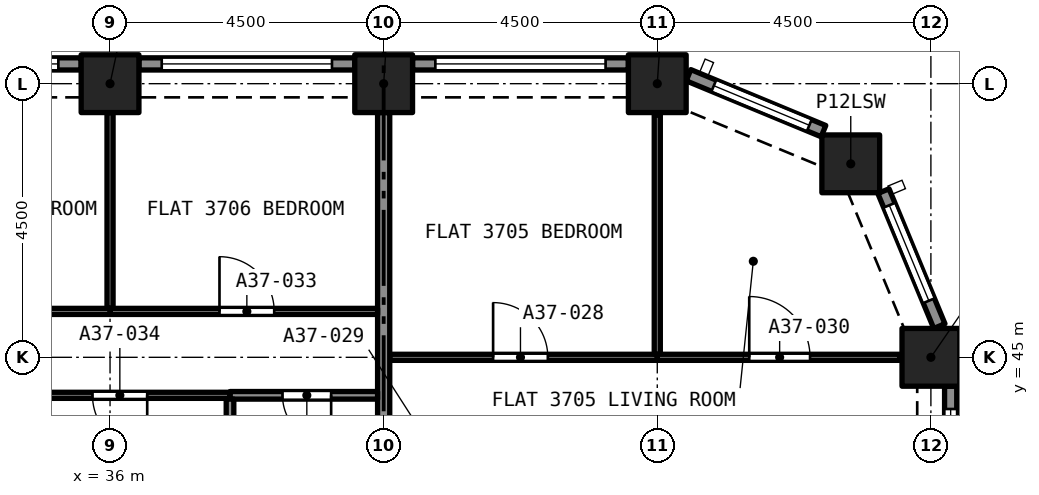
"""IFC4 building model, lengths in metres.
Left out: names, types, materials, properties, quantities, classifications, styles, units other than length and angle.
Written with IfcOpenShell. Run it as: python <this file> out.ifc"""

import sys

from ifc_helpers import new_model, si_unit, direction, frame, frame_2d, origin, origin_2d, place, context, subcontext, project, spatial, rectangle, extrude, element, fill, save


model = new_model("IFC4")
c1 = context("Model", 3, precision=1e-05, world=origin(), true_north=direction((0.0, 1.0)))
c2 = subcontext(c1, "Body", "Model", "MODEL_VIEW")
j1 = project(units=[si_unit("LENGTHUNIT", "METRE"), si_unit("PLANEANGLEUNIT", "RADIAN")], contexts=[c1])
p1 = place(None, origin())
s1 = spatial("IfcSite", under=j1, at=p1, CompositionType="ELEMENT")
p2 = place(p1, origin())
s2 = spatial("IfcBuilding", under=s1, at=p2, CompositionType="ELEMENT")
p3 = place(p2, frame((0.0, 0.0, 133.4)))
s3 = spatial("IfcBuildingStorey", under=s2, at=p3, CompositionType="ELEMENT", Elevation=133.4)
for number, where, z_axis, x_axis in (
    (1, (49.5, 45.0, 0.0), (0.0, 0.0, 1.0), (1.0, 0.0, 0.0)),
    (2, (48.182, 48.182, 0.0), (0.0, 0.0, 1.0), (1.0, 0.0, 0.0)),
    (3, (36.0, 49.5, 0.0), (0.0, 0.0, 1.0), (1.0, 0.0, 0.0)),
    (4, (40.5, 49.5, 0.0), (0.0, 0.0, 1.0), (1.0, 0.0, 0.0)),
    (5, (45.0, 49.5, 0.0), (0.0, 0.0, 1.0), (1.0, 0.0, 0.0)),
):
    element("IfcColumn", number, at=place(p3, frame(where, z_axis=z_axis, x_axis=x_axis)), inside=s3, PredefinedType="COLUMN", context=c2, shape_type="SweptSolid", body=[
        extrude(rectangle(XDim=0.95, YDim=0.95, at=origin_2d()), origin(), (0.0, 0.0, 1.0), 3.2),
    ])
p4 = place(p3, frame((49.825, 44.525, 0.0), z_axis=(0.0, 0.0, 1.0), x_axis=(0.0, -1.0, 0.0)))
e6 = element("IfcWall", 6, at=p4, inside=s3, PredefinedType="SOLIDWALL", context=c2, shape_type="SweptSolid", body=[
    extrude(rectangle(XDim=3.55, YDim=0.2, at=frame_2d((1.775, 0.0))), origin(), (0.0, 0.0, 1.0), 3.2),
])
p5 = place(p4, frame((0.375, 0.0, 0.45)))
e7 = element("IfcOpeningElement", 7, at=p5, cuts=e6, PredefinedType="OPENING", context=c2, shape_type="SweptSolid", body=[
    extrude(rectangle(XDim=2.8, YDim=1.95, at=frame_2d((1.4, 0.975))), frame((0.0, 0.11, 0.0), z_axis=(0.0, -1.0, 0.0), x_axis=(1.0, 0.0, 0.0)), (0.0, 0.0, 1.0), 0.22),
])
p6 = place(p3, frame((48.72, 47.733, 0.0), z_axis=(0.0, 0.0, 1.0), x_axis=(0.382680855588, -0.923880599843, 0.0)))
e8 = element("IfcWall", 8, at=p6, inside=s3, PredefinedType="SOLIDWALL", context=c2, shape_type="SweptSolid", body=[
    extrude(rectangle(XDim=2.403, YDim=0.2, at=frame_2d((1.201, 0.0))), origin(), (0.0, 0.0, 1.0), 3.2),
])
p7 = place(p6, frame((0.251, 0.0, 0.45)))
e9 = element("IfcOpeningElement", 9, at=p7, cuts=e8, PredefinedType="OPENING", context=c2, shape_type="SweptSolid", body=[
    extrude(rectangle(XDim=1.7, YDim=1.95, at=frame_2d((0.85, 0.975))), frame((0.0, 0.11, 0.0), z_axis=(0.0, -1.0, 0.0), x_axis=(1.0, 0.0, 0.0)), (0.0, 0.0, 1.0), 0.22),
])
p8 = place(p3, frame((45.513, 49.639, 0.0), z_axis=(0.0, 0.0, 1.0), x_axis=(0.923880599843, -0.382680855588, 0.0)))
e10 = element("IfcWall", 10, at=p8, inside=s3, PredefinedType="SOLIDWALL", context=c2, shape_type="SweptSolid", body=[
    extrude(rectangle(XDim=2.403, YDim=0.2, at=frame_2d((1.201, 0.0))), origin(), (0.0, 0.0, 1.0), 3.2),
])
p9 = place(p8, frame((0.451, 0.0, 0.45)))
e11 = element("IfcOpeningElement", 11, at=p9, cuts=e10, PredefinedType="OPENING", context=c2, shape_type="SweptSolid", body=[
    extrude(rectangle(XDim=1.7, YDim=1.95, at=frame_2d((0.85, 0.975))), frame((0.0, 0.11, 0.0), z_axis=(0.0, -1.0, 0.0), x_axis=(1.0, 0.0, 0.0)), (0.0, 0.0, 1.0), 0.22),
])
p10 = place(p3, frame((40.975, 49.825, 0.0), z_axis=(0.0, 0.0, 1.0), x_axis=(1.0, 0.0, 0.0)))
e12 = element("IfcWall", 12, at=p10, inside=s3, PredefinedType="SOLIDWALL", context=c2, shape_type="SweptSolid", body=[
    extrude(rectangle(XDim=3.55, YDim=0.2, at=frame_2d((1.775, 0.0))), origin(), (0.0, 0.0, 1.0), 3.2),
])
p11 = place(p10, frame((0.375, 0.0, 0.45)))
e13 = element("IfcOpeningElement", 13, at=p11, cuts=e12, PredefinedType="OPENING", context=c2, shape_type="SweptSolid", body=[
    extrude(rectangle(XDim=2.8, YDim=1.95, at=frame_2d((1.4, 0.975))), frame((0.0, 0.11, 0.0), z_axis=(0.0, -1.0, 0.0), x_axis=(1.0, 0.0, 0.0)), (0.0, 0.0, 1.0), 0.22),
])
p12 = place(p3, frame((36.475, 49.825, 0.0), z_axis=(0.0, 0.0, 1.0), x_axis=(1.0, 0.0, 0.0)))
e14 = element("IfcWall", 14, at=p12, inside=s3, PredefinedType="SOLIDWALL", context=c2, shape_type="SweptSolid", body=[
    extrude(rectangle(XDim=3.55, YDim=0.2, at=frame_2d((1.775, 0.0))), origin(), (0.0, 0.0, 1.0), 3.2),
])
p13 = place(p12, frame((0.375, 0.0, 0.45)))
e15 = element("IfcOpeningElement", 15, at=p13, cuts=e14, PredefinedType="OPENING", context=c2, shape_type="SweptSolid", body=[
    extrude(rectangle(XDim=2.8, YDim=1.95, at=frame_2d((1.4, 0.975))), frame((0.0, 0.11, 0.0), z_axis=(0.0, -1.0, 0.0), x_axis=(1.0, 0.0, 0.0)), (0.0, 0.0, 1.0), 0.22),
])
p14 = place(p3, frame((31.975, 49.825, 0.0), z_axis=(0.0, 0.0, 1.0), x_axis=(1.0, 0.0, 0.0)))
e16 = element("IfcWall", 16, at=p14, inside=s3, PredefinedType="SOLIDWALL", context=c2, shape_type="SweptSolid", body=[
    extrude(rectangle(XDim=3.55, YDim=0.2, at=frame_2d((1.775, 0.0))), origin(), (0.0, 0.0, 1.0), 3.2),
])
p15 = place(p14, frame((0.375, 0.0, 0.45)))
e17 = element("IfcOpeningElement", 17, at=p15, cuts=e16, PredefinedType="OPENING", context=c2, shape_type="SweptSolid", body=[
    extrude(rectangle(XDim=2.8, YDim=1.95, at=frame_2d((1.4, 0.975))), frame((0.0, 0.11, 0.0), z_axis=(0.0, -1.0, 0.0), x_axis=(1.0, 0.0, 0.0)), (0.0, 0.0, 1.0), 0.22),
])
p16 = place(p3, frame((40.6, 45.0, 0.0), z_axis=(0.0, 0.0, 1.0), x_axis=(1.0, 0.0, 0.0)))
e18 = element("IfcWall", 18, at=p16, inside=s3, PredefinedType="PARTITIONING", context=c2, shape_type="SweptSolid", body=[
    extrude(rectangle(XDim=4.4, YDim=0.1, at=frame_2d((2.2, 0.0))), origin(), (0.0, 0.0, 1.0), 2.9),
])
p17 = place(p16, frame((1.7, 0.0, 0.0)))
e19 = element("IfcOpeningElement", 19, at=p17, cuts=e18, PredefinedType="OPENING", context=c2, shape_type="SweptSolid", body=[
    extrude(rectangle(XDim=0.9, YDim=2.1, at=frame_2d((0.45, 1.05))), frame((0.0, 0.06, 0.0), z_axis=(0.0, -1.0, 0.0), x_axis=(1.0, 0.0, 0.0)), (0.0, 0.0, 1.0), 0.12),
])
p18 = place(p3, frame((45.0, 45.05, 0.0), z_axis=(0.0, 0.0, 1.0), x_axis=(0.0, 1.0, 0.0)))
e20 = element("IfcWall", 20, at=p18, inside=s3, PredefinedType="PARTITIONING", context=c2, shape_type="SweptSolid", body=[
    extrude(rectangle(XDim=3.936, YDim=0.1, at=frame_2d((1.968, 0.0))), origin(), (0.0, 0.0, 1.0), 2.9),
])
p19 = place(p3, frame((45.0, 45.0, 0.0), z_axis=(0.0, 0.0, 1.0), x_axis=(1.0, 0.0, 0.0)))
e21 = element("IfcWall", 21, at=p19, inside=s3, PredefinedType="PARTITIONING", context=c2, shape_type="SweptSolid", body=[
    extrude(rectangle(XDim=3.986, YDim=0.1, at=frame_2d((1.993, 0.0))), origin(), (0.0, 0.0, 1.0), 2.9),
])
p20 = place(p19, frame((1.512, 0.0, 0.0)))
e22 = element("IfcOpeningElement", 22, at=p20, cuts=e21, PredefinedType="OPENING", context=c2, shape_type="SweptSolid", body=[
    extrude(rectangle(XDim=1.0, YDim=2.1, at=frame_2d((0.5, 1.05))), frame((0.0, 0.06, 0.0), z_axis=(0.0, -1.0, 0.0), x_axis=(1.0, 0.0, 0.0)), (0.0, 0.0, 1.0), 0.12),
])
p21 = place(p3, frame((40.5, 40.25, 0.0), z_axis=(0.0, 0.0, 1.0), x_axis=(0.0, 1.0, 0.0)))
e23 = element("IfcWall", 23, at=p21, inside=s3, PredefinedType="PARTITIONING", context=c2, shape_type="SweptSolid", body=[
    extrude(rectangle(XDim=8.775, YDim=0.2, at=frame_2d((4.387, 0.0))), origin(), (0.0, 0.0, 1.0), 2.9),
])
p22 = place(p3, frame((40.4, 44.375, 0.0), z_axis=(0.0, 0.0, 1.0), x_axis=(-1.0, 0.0, 0.0)))
e24 = element("IfcWall", 24, at=p22, inside=s3, PredefinedType="PARTITIONING", context=c2, shape_type="SweptSolid", body=[
    extrude(rectangle(XDim=2.427, YDim=0.125, at=frame_2d((1.214, 0.0))), origin(), (0.0, 0.0, 1.0), 2.9),
])
p23 = place(p22, frame((0.764, 0.0, 0.0)))
e25 = element("IfcOpeningElement", 25, at=p23, cuts=e24, PredefinedType="OPENING", context=c2, shape_type="SweptSolid", body=[
    extrude(rectangle(XDim=0.8, YDim=2.1, at=frame_2d((0.4, 1.05))), frame((0.0, 0.073, 0.0), z_axis=(0.0, -1.0, 0.0), x_axis=(1.0, 0.0, 0.0)), (0.0, 0.0, 1.0), 0.145),
])
p24 = place(p3, frame((37.973, 40.25, 0.0), z_axis=(0.0, 0.0, 1.0), x_axis=(0.0, 1.0, 0.0)))
e26 = element("IfcWall", 26, at=p24, inside=s3, PredefinedType="PARTITIONING", context=c2, shape_type="SweptSolid", body=[
    extrude(rectangle(XDim=4.062, YDim=0.125, at=frame_2d((2.031, 0.0))), origin(), (0.0, 0.0, 1.0), 2.9),
])
p25 = place(p3, frame((36.0, 45.755, 0.0), z_axis=(0.0, 0.0, 1.0), x_axis=(1.0, 0.0, 0.0)))
e27 = element("IfcWall", 27, at=p25, inside=s3, PredefinedType="PARTITIONING", context=c2, shape_type="SweptSolid", body=[
    extrude(rectangle(XDim=4.4, YDim=0.1, at=frame_2d((2.2, 0.0))), origin(), (0.0, 0.0, 1.0), 2.9),
])
p26 = place(p25, frame((1.8, 0.0, 0.0)))
e28 = element("IfcOpeningElement", 28, at=p26, cuts=e27, PredefinedType="OPENING", context=c2, shape_type="SweptSolid", body=[
    extrude(rectangle(XDim=0.9, YDim=2.1, at=frame_2d((0.45, 1.05))), frame((0.0, 0.06, 0.0), z_axis=(0.0, -1.0, 0.0), x_axis=(1.0, 0.0, 0.0)), (0.0, 0.0, 1.0), 0.12),
])
p27 = place(p3, frame((36.0, 45.805, 0.0), z_axis=(0.0, 0.0, 1.0), x_axis=(0.0, 1.0, 0.0)))
e29 = element("IfcWall", 29, at=p27, inside=s3, PredefinedType="PARTITIONING", context=c2, shape_type="SweptSolid", body=[
    extrude(rectangle(XDim=3.22, YDim=0.1, at=frame_2d((1.61, 0.0))), origin(), (0.0, 0.0, 1.0), 2.9),
])
p28 = place(p3, frame((37.973, 44.375, 0.0), z_axis=(0.0, 0.0, 1.0), x_axis=(-1.0, 0.0, 0.0)))
e30 = element("IfcWall", 30, at=p28, inside=s3, PredefinedType="PARTITIONING", context=c2, shape_type="SweptSolid", body=[
    extrude(rectangle(XDim=3.673, YDim=0.1, at=frame_2d((1.836, 0.0))), origin(), (0.0, 0.0, 1.0), 2.9),
])
p29 = place(p28, frame((1.361, 0.0, 0.0)))
e31 = element("IfcOpeningElement", 31, at=p29, cuts=e30, PredefinedType="OPENING", context=c2, shape_type="SweptSolid", body=[
    extrude(rectangle(XDim=0.9, YDim=2.1, at=frame_2d((0.45, 1.05))), frame((0.0, 0.06, 0.0), z_axis=(0.0, -1.0, 0.0), x_axis=(1.0, 0.0, 0.0)), (0.0, 0.0, 1.0), 0.12),
])
p30 = place(p3, frame((31.6, 45.755, 0.0), z_axis=(0.0, 0.0, 1.0), x_axis=(1.0, 0.0, 0.0)))
e32 = element("IfcWall", 32, at=p30, inside=s3, PredefinedType="PARTITIONING", context=c2, shape_type="SweptSolid", body=[
    extrude(rectangle(XDim=4.4, YDim=0.1, at=frame_2d((2.2, 0.0))), origin(), (0.0, 0.0, 1.0), 2.9),
])
p31 = place(p30, frame((1.65, 0.0, 0.0)))
e33 = element("IfcOpeningElement", 33, at=p31, cuts=e32, PredefinedType="OPENING", context=c2, shape_type="SweptSolid", body=[
    extrude(rectangle(XDim=1.0, YDim=2.1, at=frame_2d((0.5, 1.05))), frame((0.0, 0.06, 0.0), z_axis=(0.0, -1.0, 0.0), x_axis=(1.0, 0.0, 0.0)), (0.0, 0.0, 1.0), 0.12),
])
p32 = place(p5, origin())
e34 = element("IfcWindow", 34, at=p32, inside=s3, PartitioningType="SINGLE_PANEL", PredefinedType="WINDOW", context=c2, shape_type="SweptSolid", body=[
    extrude(rectangle(XDim=2.8, YDim=1.95, at=frame_2d((1.4, 0.975))), frame((0.0, 0.03, 0.0), z_axis=(0.0, -1.0, 0.0), x_axis=(1.0, 0.0, 0.0)), (0.0, 0.0, 1.0), 0.06),
])
fill(e7, e34)
p33 = place(p7, origin())
e35 = element("IfcWindow", 35, at=p33, inside=s3, PartitioningType="SINGLE_PANEL", PredefinedType="WINDOW", context=c2, shape_type="SweptSolid", body=[
    extrude(rectangle(XDim=1.7, YDim=1.95, at=frame_2d((0.85, 0.975))), frame((0.0, 0.03, 0.0), z_axis=(0.0, -1.0, 0.0), x_axis=(1.0, 0.0, 0.0)), (0.0, 0.0, 1.0), 0.06),
])
fill(e9, e35)
p34 = place(p9, origin())
e36 = element("IfcWindow", 36, at=p34, inside=s3, PartitioningType="SINGLE_PANEL", PredefinedType="WINDOW", context=c2, shape_type="SweptSolid", body=[
    extrude(rectangle(XDim=1.7, YDim=1.95, at=frame_2d((0.85, 0.975))), frame((0.0, 0.03, 0.0), z_axis=(0.0, -1.0, 0.0), x_axis=(1.0, 0.0, 0.0)), (0.0, 0.0, 1.0), 0.06),
])
fill(e11, e36)
p35 = place(p11, origin())
e37 = element("IfcWindow", 37, at=p35, inside=s3, PartitioningType="SINGLE_PANEL", PredefinedType="WINDOW", context=c2, shape_type="SweptSolid", body=[
    extrude(rectangle(XDim=2.8, YDim=1.95, at=frame_2d((1.4, 0.975))), frame((0.0, 0.03, 0.0), z_axis=(0.0, -1.0, 0.0), x_axis=(1.0, 0.0, 0.0)), (0.0, 0.0, 1.0), 0.06),
])
fill(e13, e37)
p36 = place(p13, origin())
e38 = element("IfcWindow", 38, at=p36, inside=s3, PartitioningType="SINGLE_PANEL", PredefinedType="WINDOW", context=c2, shape_type="SweptSolid", body=[
    extrude(rectangle(XDim=2.8, YDim=1.95, at=frame_2d((1.4, 0.975))), frame((0.0, 0.03, 0.0), z_axis=(0.0, -1.0, 0.0), x_axis=(1.0, 0.0, 0.0)), (0.0, 0.0, 1.0), 0.06),
])
fill(e15, e38)
p37 = place(p15, origin())
e39 = element("IfcWindow", 39, at=p37, inside=s3, PartitioningType="SINGLE_PANEL", PredefinedType="WINDOW", context=c2, shape_type="SweptSolid", body=[
    extrude(rectangle(XDim=2.8, YDim=1.95, at=frame_2d((1.4, 0.975))), frame((0.0, 0.03, 0.0), z_axis=(0.0, -1.0, 0.0), x_axis=(1.0, 0.0, 0.0)), (0.0, 0.0, 1.0), 0.06),
])
fill(e17, e39)
p38 = place(p17, origin())
e40 = element("IfcDoor", 40, at=p38, inside=s3, OperationType="SINGLE_SWING_LEFT", PredefinedType="DOOR", context=c2, shape_type="SweptSolid", body=[
    extrude(rectangle(XDim=0.9, YDim=2.1, at=frame_2d((0.45, 1.05))), frame((0.0, 0.025, 0.0), z_axis=(0.0, -1.0, 0.0), x_axis=(1.0, 0.0, 0.0)), (0.0, 0.0, 1.0), 0.05),
])
fill(e19, e40)
p39 = place(p20, origin())
e41 = element("IfcDoor", 41, at=p39, inside=s3, OperationType="SINGLE_SWING_RIGHT", PredefinedType="DOOR", context=c2, shape_type="SweptSolid", body=[
    extrude(rectangle(XDim=1.0, YDim=2.1, at=frame_2d((0.5, 1.05))), frame((0.0, 0.025, 0.0), z_axis=(0.0, -1.0, 0.0), x_axis=(1.0, 0.0, 0.0)), (0.0, 0.0, 1.0), 0.05),
])
fill(e22, e41)
p40 = place(p23, origin())
e42 = element("IfcDoor", 42, at=p40, inside=s3, OperationType="SINGLE_SWING_LEFT", PredefinedType="DOOR", context=c2, shape_type="SweptSolid", body=[
    extrude(rectangle(XDim=0.8, YDim=2.1, at=frame_2d((0.4, 1.05))), frame((0.0, 0.025, 0.0), z_axis=(0.0, -1.0, 0.0), x_axis=(1.0, 0.0, 0.0)), (0.0, 0.0, 1.0), 0.05),
])
fill(e25, e42)
p41 = place(p26, origin())
e43 = element("IfcDoor", 43, at=p41, inside=s3, OperationType="SINGLE_SWING_RIGHT", PredefinedType="DOOR", context=c2, shape_type="SweptSolid", body=[
    extrude(rectangle(XDim=0.9, YDim=2.1, at=frame_2d((0.45, 1.05))), frame((0.0, 0.025, 0.0), z_axis=(0.0, -1.0, 0.0), x_axis=(1.0, 0.0, 0.0)), (0.0, 0.0, 1.0), 0.05),
])
fill(e28, e43)
p42 = place(p29, origin())
e44 = element("IfcDoor", 44, at=p42, inside=s3, OperationType="SINGLE_SWING_LEFT", PredefinedType="DOOR", context=c2, shape_type="SweptSolid", body=[
    extrude(rectangle(XDim=0.9, YDim=2.1, at=frame_2d((0.45, 1.05))), frame((0.0, 0.025, 0.0), z_axis=(0.0, -1.0, 0.0), x_axis=(1.0, 0.0, 0.0)), (0.0, 0.0, 1.0), 0.05),
])
fill(e31, e44)
save(model, sys.argv[1])
